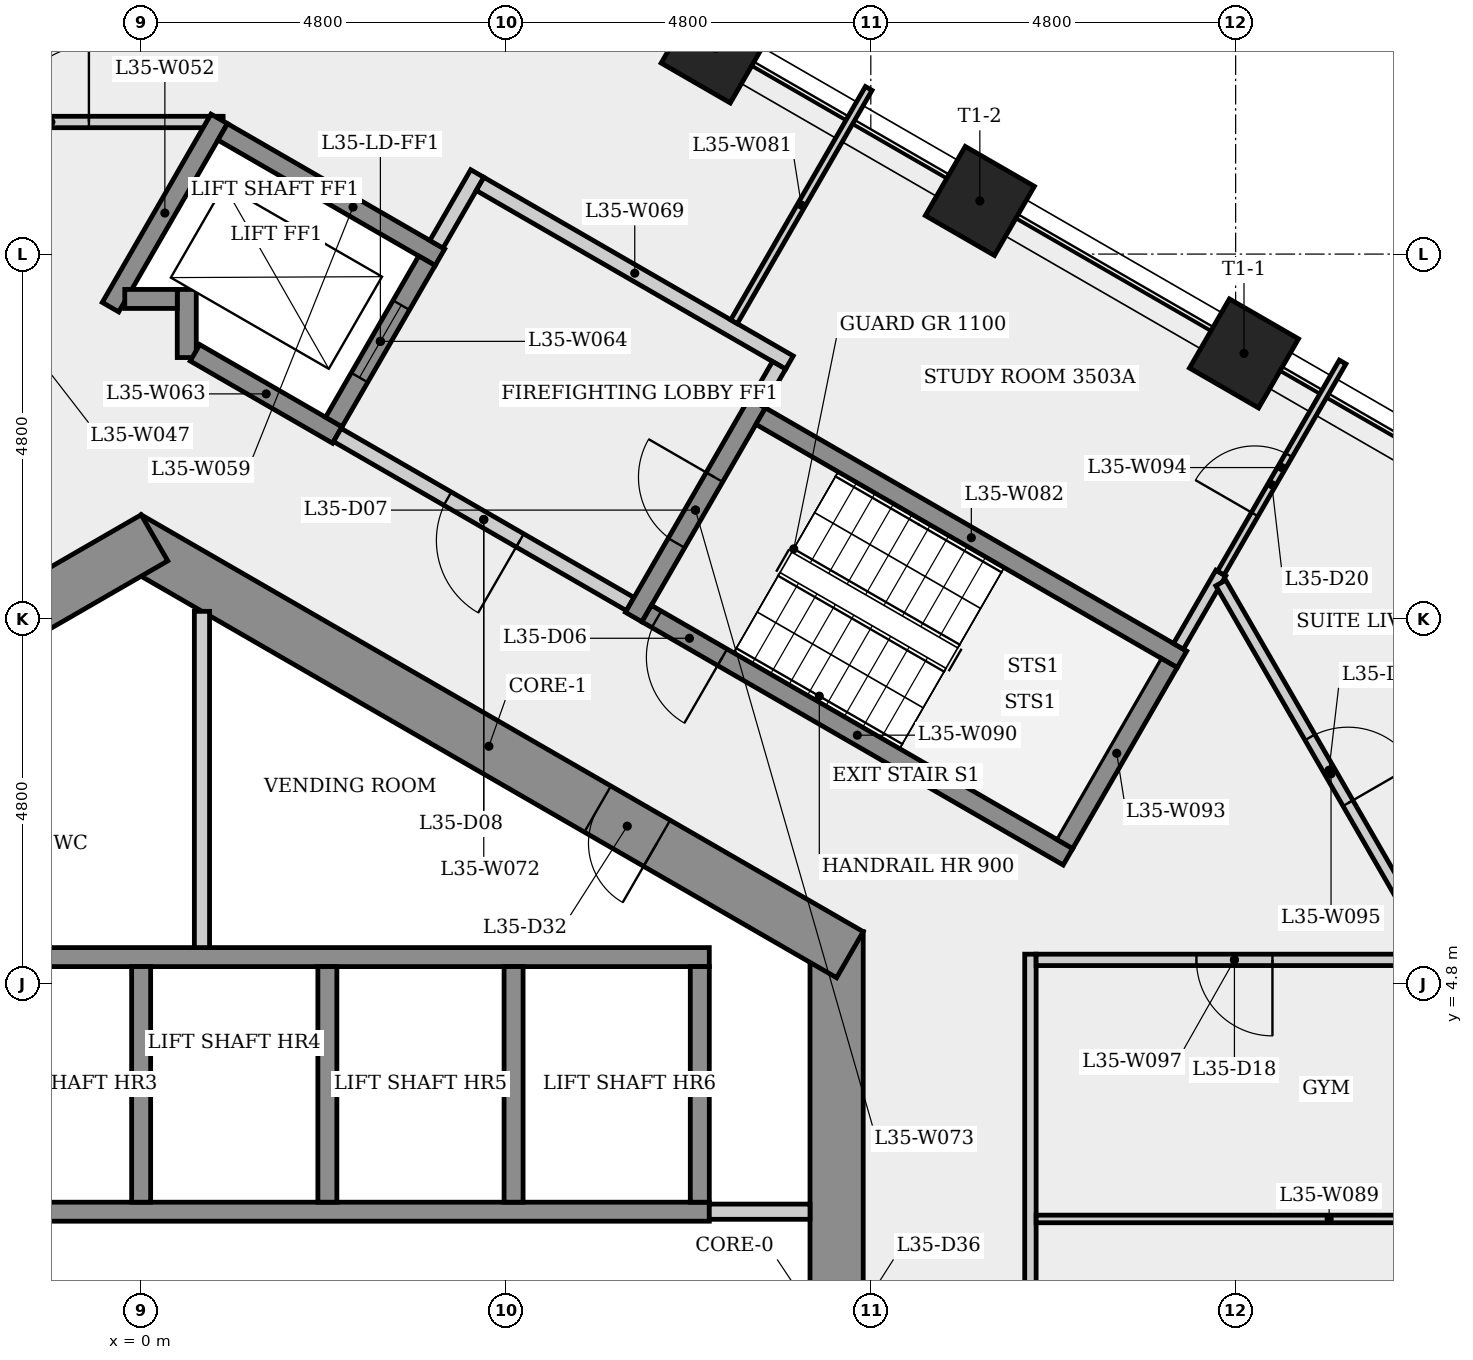
"""IFC4 building model, lengths in metres.
Left out: names, types, materials, properties, quantities, classifications, styles, units other than length and angle.
Written with IfcOpenShell. Run it as: python <this file> out.ifc"""

import sys

from ifc_helpers import new_model, si_unit, direction, frame, frame_2d, origin, origin_2d, place, context, subcontext, project, spatial, rectangle, extrude, element, fill, save


model = new_model("IFC4")
c1 = context("Model", 3, precision=1e-05, world=origin(), true_north=direction((0.0, 1.0)))
c2 = subcontext(c1, "Body", "Model", "MODEL_VIEW")
j1 = project(units=[si_unit("LENGTHUNIT", "METRE"), si_unit("PLANEANGLEUNIT", "RADIAN")], contexts=[c1])
p1 = place(None, origin())
s1 = spatial("IfcSite", under=j1, at=p1, CompositionType="ELEMENT")
p2 = place(p1, origin())
s2 = spatial("IfcBuilding", under=s1, at=p2, CompositionType="ELEMENT")
p3 = place(p2, frame((0.0, 0.0, 132.5)))
s3 = spatial("IfcBuildingStorey", under=s2, at=p3, CompositionType="ELEMENT", Elevation=132.5)
p4 = place(p3, frame((9.15, -5.485, 0.0), z_axis=(0.0, 0.0, 1.0), x_axis=(0.0, 1.0, 0.0)))
e1 = element("IfcWall", 1, at=p4, inside=s3, PredefinedType="SHEAR", context=c2, shape_type="SweptSolid", body=[
    extrude(rectangle(XDim=10.97, YDim=0.7, at=frame_2d((5.485, 0.0))), origin(), (0.0, 0.0, 1.0), 3.4),
])
p5 = place(p4, frame((4.685, 0.0, 0.0)))
e2 = element("IfcOpeningElement", 2, at=p5, cuts=e1, PredefinedType="OPENING", context=c2, shape_type="SweptSolid", body=[
    extrude(rectangle(XDim=1.6, YDim=2.1, at=frame_2d((0.8, 1.05))), frame((0.0, 0.36, 0.0), z_axis=(0.0, -1.0, 0.0), x_axis=(1.0, 0.0, 0.0)), (0.0, 0.0, 1.0), 0.72),
])
p6 = place(p3, frame((9.325, 5.182, 0.0), z_axis=(0.0, 0.0, 1.0), x_axis=(-0.866023993627, 0.500002442456, 0.0)))
e3 = element("IfcWall", 3, at=p6, inside=s3, PredefinedType="SHEAR", context=c2, shape_type="SweptSolid", body=[
    extrude(rectangle(XDim=10.97, YDim=0.7, at=frame_2d((5.485, 0.0))), origin(), (0.0, 0.0, 1.0), 3.4),
])
p7 = place(p6, frame((2.933, 0.0, 0.0)))
e4 = element("IfcOpeningElement", 4, at=p7, cuts=e3, PredefinedType="OPENING", context=c2, shape_type="SweptSolid", body=[
    extrude(rectangle(XDim=0.9, YDim=2.1, at=frame_2d((0.45, 1.05))), frame((0.0, 0.36, 0.0), z_axis=(0.0, -1.0, 0.0), x_axis=(1.0, 0.0, 0.0)), (0.0, 0.0, 1.0), 0.72),
])
p8 = place(p3, frame((0.175, 10.667, 0.0), z_axis=(0.0, 0.0, 1.0), x_axis=(-0.866023993627, -0.500002442456, 0.0)))
e5 = element("IfcWall", 5, at=p8, inside=s3, PredefinedType="SHEAR", context=c2, shape_type="SweptSolid", body=[
    extrude(rectangle(XDim=10.97, YDim=0.7, at=frame_2d((5.485, 0.0))), origin(), (0.0, 0.0, 1.0), 3.4),
])
p9 = place(p8, frame((9.254, 0.0, 0.0)))
e6 = element("IfcOpeningElement", 6, at=p9, cuts=e5, PredefinedType="OPENING", context=c2, shape_type="SweptSolid", body=[
    extrude(rectangle(XDim=0.9, YDim=2.1, at=frame_2d((0.45, 1.05))), frame((0.0, 0.36, 0.0), z_axis=(0.0, -1.0, 0.0), x_axis=(1.0, 0.0, 0.0)), (0.0, 0.0, 1.0), 0.72),
])
p10 = place(p8, frame((2.033, 0.0, 0.0)))
e7 = element("IfcOpeningElement", 7, at=p10, cuts=e5, PredefinedType="OPENING", context=c2, shape_type="SweptSolid", body=[
    extrude(rectangle(XDim=0.9, YDim=2.1, at=frame_2d((0.45, 1.05))), frame((0.0, 0.36, 0.0), z_axis=(0.0, -1.0, 0.0), x_axis=(1.0, 0.0, 0.0)), (0.0, 0.0, 1.0), 0.72),
])
for number, where, z_axis, x_axis in (
    (8, (14.51, 13.093, 0.0), (0.0, 0.0, 1.0), (0.5, 0.866, 0.0)),
    (9, (11.035, 15.099, 0.0), (0.0, 0.0, 1.0), (0.5, 0.866, 0.0)),
    (10, (7.559, 17.106, 0.0), (0.0, 0.0, 1.0), (0.5, 0.866, 0.0)),
):
    element("IfcColumn", number, at=place(p3, frame(where, z_axis=z_axis, x_axis=x_axis)), inside=s3, PredefinedType="COLUMN", context=c2, shape_type="SweptSolid", body=[
        extrude(rectangle(XDim=1.05, YDim=1.05, at=origin_2d()), origin(), (0.0, 0.0, 1.0), 3.4),
    ])
p11 = place(p3, frame((-7.475, 1.8, 0.0), z_axis=(0.0, 0.0, 1.0), x_axis=(1.0, 0.0, 0.0)))
e11 = element("IfcWall", 11, at=p11, inside=s3, PredefinedType="SHEAR", context=c2, shape_type="SweptSolid", body=[
    extrude(rectangle(XDim=14.95, YDim=0.25, at=frame_2d((7.475, 0.0))), origin(), (0.0, 0.0, 1.0), 3.0),
])
p12 = place(p3, frame((-7.225, 5.15, 0.0), z_axis=(0.0, 0.0, 1.0), x_axis=(1.0, 0.0, 0.0)))
e12 = element("IfcWall", 12, at=p12, inside=s3, PredefinedType="SHEAR", context=c2, shape_type="SweptSolid", body=[
    extrude(rectangle(XDim=14.7, YDim=0.25, at=frame_2d((7.35, 0.0))), origin(), (0.0, 0.0, 1.0), 3.0),
])
p13 = place(p3, frame((-3.488, 16.138, 0.0), z_axis=(0.0, 0.0, 1.0), x_axis=(1.0, 0.0, 0.0)))
e13 = element("IfcWall", 13, at=p13, inside=s3, PredefinedType="PARTITIONING", context=c2, shape_type="SweptSolid", body=[
    extrude(rectangle(XDim=4.566, YDim=0.15, at=frame_2d((2.283, 0.0))), origin(), (0.0, 0.0, 1.0), 3.0),
])
p14 = place(p13, frame((1.801, 0.0, 0.0)))
e14 = element("IfcOpeningElement", 14, at=p14, cuts=e13, PredefinedType="OPENING", context=c2, shape_type="SweptSolid", body=[
    extrude(rectangle(XDim=1.0, YDim=2.1, at=frame_2d((0.5, 1.05))), frame((0.0, 0.085, 0.0), z_axis=(0.0, -1.0, 0.0), x_axis=(1.0, 0.0, 0.0)), (0.0, 0.0, 1.0), 0.17),
])
p15 = place(p3, frame((-0.403, 13.702, 0.0), z_axis=(0.0, 0.0, 1.0), x_axis=(0.499976111731, 0.866039195244, 0.0)))
e15 = element("IfcWall", 15, at=p15, inside=s3, PredefinedType="SHEAR", context=c2, shape_type="SweptSolid", body=[
    extrude(rectangle(XDim=2.861, YDim=0.25, at=frame_2d((1.43, 0.0))), origin(), (0.0, 0.0, 1.0), 3.0),
])
p16 = place(p3, frame((0.0, 5.025, 0.0), z_axis=(0.0, 0.0, 1.0), x_axis=(0.0, -1.0, 0.0)))
e16 = element("IfcWall", 16, at=p16, inside=s3, PredefinedType="SHEAR", context=c2, shape_type="SweptSolid", body=[
    extrude(rectangle(XDim=3.1, YDim=0.25, at=frame_2d((1.55, 0.0))), origin(), (0.0, 0.0, 1.0), 3.4),
])
p17 = place(p3, frame((0.6, 13.039, 0.0), z_axis=(0.0, 0.0, 1.0), x_axis=(0.0, 1.0, 0.0)))
e17 = element("IfcWall", 17, at=p17, inside=s3, PredefinedType="SHEAR", context=c2, shape_type="SweptSolid", body=[
    extrude(rectangle(XDim=0.896, YDim=0.25, at=frame_2d((0.448, 0.0))), origin(), (0.0, 0.0, 1.0), 3.0),
])
p18 = place(p3, frame((0.475, 13.81, 0.0), z_axis=(0.0, 0.0, 1.0), x_axis=(-1.0, 0.0, 0.0)))
e18 = element("IfcWall", 18, at=p18, inside=s3, PredefinedType="SHEAR", context=c2, shape_type="SweptSolid", body=[
    extrude(rectangle(XDim=0.691, YDim=0.25, at=frame_2d((0.345, 0.0))), origin(), (0.0, 0.0, 1.0), 3.4),
])
p19 = place(p3, frame((0.8, 9.699, 0.0), z_axis=(0.0, 0.0, 1.0), x_axis=(0.0, -1.0, 0.0)))
e19 = element("IfcWall", 19, at=p19, inside=s3, PredefinedType="PARTITIONING", context=c2, shape_type="SweptSolid", body=[
    extrude(rectangle(XDim=4.425, YDim=0.2, at=frame_2d((2.212, 0.0))), origin(), (0.0, 0.0, 1.0), 3.0),
])
p20 = place(p3, frame((1.073, 16.008, 0.0), z_axis=(0.0, 0.0, 1.0), x_axis=(0.866040211805, -0.499974350878, 0.0)))
e20 = element("IfcWall", 20, at=p20, inside=s3, PredefinedType="SHEAR", context=c2, shape_type="SweptSolid", body=[
    extrude(rectangle(XDim=3.3, YDim=0.25, at=frame_2d((1.65, 0.0))), origin(), (0.0, 0.0, 1.0), 3.0),
])
p21 = place(p3, frame((2.45, 5.025, 0.0), z_axis=(0.0, 0.0, 1.0), x_axis=(0.0, -1.0, 0.0)))
e21 = element("IfcWall", 21, at=p21, inside=s3, PredefinedType="SHEAR", context=c2, shape_type="SweptSolid", body=[
    extrude(rectangle(XDim=3.1, YDim=0.25, at=frame_2d((1.55, 0.0))), origin(), (0.0, 0.0, 1.0), 3.4),
])
p22 = place(p3, frame((2.581, 12.02, 0.0), z_axis=(0.0, 0.0, 1.0), x_axis=(-0.86603892542, 0.499976579108, 0.0)))
e22 = element("IfcWall", 22, at=p22, inside=s3, PredefinedType="SHEAR", context=c2, shape_type="SweptSolid", body=[
    extrude(rectangle(XDim=2.162, YDim=0.25, at=frame_2d((1.081, 0.0))), origin(), (0.0, 0.0, 1.0), 3.0),
])
p23 = place(p3, frame((2.535, 12.191, 0.0), z_axis=(0.0, 0.0, 1.0), x_axis=(0.500061746146, 0.865989751695, 0.0)))
e23 = element("IfcWall", 23, at=p23, inside=s3, PredefinedType="SHEAR", context=c2, shape_type="SweptSolid", body=[
    extrude(rectangle(XDim=2.45, YDim=0.25, at=frame_2d((1.225, 0.0))), origin(), (0.0, 0.0, 1.0), 3.4),
])
p24 = place(p23, frame((0.675, 0.0, 0.0)))
e24 = element("IfcOpeningElement", 24, at=p24, cuts=e23, PredefinedType="OPENING", context=c2, shape_type="SweptSolid", body=[
    extrude(rectangle(XDim=1.1, YDim=2.1, at=frame_2d((0.55, 1.05))), frame((0.0, 0.135, 0.0), z_axis=(0.0, -1.0, 0.0), x_axis=(1.0, 0.0, 0.0)), (0.0, 0.0, 1.0), 0.27),
])
p25 = place(p3, frame((3.885, 14.529, 0.0), z_axis=(0.0, 0.0, 1.0), x_axis=(0.499997628298, 0.866026773083, 0.0)))
e25 = element("IfcWall", 25, at=p25, inside=s3, PredefinedType="PARTITIONING", context=c2, shape_type="SweptSolid", body=[
    extrude(rectangle(XDim=1.075, YDim=0.2, at=frame_2d((0.538, 0.0))), origin(), (0.0, 0.0, 1.0), 3.0),
])
p26 = place(p3, frame((4.459, 15.323, 0.0), z_axis=(0.0, 0.0, 1.0), x_axis=(0.866016039709, -0.500016218704, 0.0)))
e26 = element("IfcWall", 26, at=p26, inside=s3, PredefinedType="PARTITIONING", context=c2, shape_type="SweptSolid", body=[
    extrude(rectangle(XDim=4.7, YDim=0.2, at=frame_2d((2.35, 0.0))), origin(), (0.0, 0.0, 1.0), 3.0),
])
p27 = place(p3, frame((4.9, 5.025, 0.0), z_axis=(0.0, 0.0, 1.0), x_axis=(0.0, -1.0, 0.0)))
e27 = element("IfcWall", 27, at=p27, inside=s3, PredefinedType="SHEAR", context=c2, shape_type="SweptSolid", body=[
    extrude(rectangle(XDim=3.1, YDim=0.25, at=frame_2d((1.55, 0.0))), origin(), (0.0, 0.0, 1.0), 3.4),
])
p28 = place(p3, frame((6.435, 9.795, 0.0), z_axis=(0.0, 0.0, 1.0), x_axis=(-0.866012907634, 0.500021643343, 0.0)))
e28 = element("IfcWall", 28, at=p28, inside=s3, PredefinedType="PARTITIONING", context=c2, shape_type="SweptSolid", body=[
    extrude(rectangle(XDim=4.45, YDim=0.2, at=frame_2d((2.225, 0.0))), origin(), (0.0, 0.0, 1.0), 3.0),
])
p29 = place(p28, frame((1.675, 0.0, 0.0)))
e29 = element("IfcOpeningElement", 29, at=p29, cuts=e28, PredefinedType="OPENING", context=c2, shape_type="SweptSolid", body=[
    extrude(rectangle(XDim=1.1, YDim=2.1, at=frame_2d((0.55, 1.05))), frame((0.0, 0.11, 0.0), z_axis=(0.0, -1.0, 0.0), x_axis=(1.0, 0.0, 0.0)), (0.0, 0.0, 1.0), 0.22),
])
p30 = place(p3, frame((6.48, 9.624, 0.0), z_axis=(0.0, 0.0, 1.0), x_axis=(0.500017246033, 0.866015446554, 0.0)))
e30 = element("IfcWall", 30, at=p30, inside=s3, PredefinedType="SHEAR", context=c2, shape_type="SweptSolid", body=[
    extrude(rectangle(XDim=3.25, YDim=0.25, at=frame_2d((1.625, 0.0))), origin(), (0.0, 0.0, 1.0), 3.0),
])
p31 = place(p30, frame((1.125, 0.0, 0.0)))
e31 = element("IfcOpeningElement", 31, at=p31, cuts=e30, PredefinedType="OPENING", context=c2, shape_type="SweptSolid", body=[
    extrude(rectangle(XDim=1.0, YDim=2.1, at=frame_2d((0.5, 1.05))), frame((0.0, 0.135, 0.0), z_axis=(0.0, -1.0, 0.0), x_axis=(1.0, 0.0, 0.0)), (0.0, 0.0, 1.0), 0.27),
])
p32 = place(p3, frame((7.475, 1.8, 0.0), z_axis=(0.0, 0.0, 1.0), x_axis=(1.0, 0.0, 0.0)))
e32 = element("IfcWall", 32, at=p32, inside=s3, PredefinedType="PARTITIONING", context=c2, shape_type="SweptSolid", body=[
    extrude(rectangle(XDim=1.325, YDim=0.2, at=frame_2d((0.663, 0.0))), origin(), (0.0, 0.0, 1.0), 3.0),
])
p33 = place(p3, frame((7.35, 5.025, 0.0), z_axis=(0.0, 0.0, 1.0), x_axis=(0.0, -1.0, 0.0)))
e33 = element("IfcWall", 33, at=p33, inside=s3, PredefinedType="SHEAR", context=c2, shape_type="SweptSolid", body=[
    extrude(rectangle(XDim=3.1, YDim=0.25, at=frame_2d((1.55, 0.0))), origin(), (0.0, 0.0, 1.0), 3.4),
])
p34 = place(p3, frame((7.8, 13.51, 0.0), z_axis=(0.0, 0.0, 1.0), x_axis=(0.499976875499, 0.866038754309, 0.0)))
e34 = element("IfcWall", 34, at=p34, inside=s3, PredefinedType="PARTITIONING", context=c2, shape_type="SweptSolid", body=[
    extrude(rectangle(XDim=3.544, YDim=0.1, at=frame_2d((1.772, 0.0))), origin(), (0.0, 0.0, 1.0), 3.0),
])
p35 = place(p3, frame((8.151, 12.268, 0.0), z_axis=(0.0, 0.0, 1.0), x_axis=(0.866025499775, -0.499999833739, 0.0)))
e35 = element("IfcWall", 35, at=p35, inside=s3, PredefinedType="SHEAR", context=c2, shape_type="SweptSolid", body=[
    extrude(rectangle(XDim=6.4, YDim=0.25, at=frame_2d((3.2, 0.0))), origin(), (0.0, 0.0, 1.0), 3.0),
])
p36 = place(p3, frame((8.393, 12.937, 0.0), z_axis=(0.0, 0.0, 1.0), x_axis=(-0.500065409566, -0.86598763626, 0.0)))
e36 = element("IfcWall", 36, at=p36, inside=s3, PredefinedType="PARTITIONING", context=c2, shape_type="SweptSolid", body=[
    extrude(rectangle(XDim=0.575, YDim=0.2, at=frame_2d((0.288, 0.0))), origin(), (0.0, 0.0, 1.0), 3.0),
])
p37 = place(p3, frame((11.7, -5.038, 0.0), z_axis=(0.0, 0.0, 1.0), x_axis=(0.0, 1.0, 0.0)))
e37 = element("IfcWall", 37, at=p37, inside=s3, PredefinedType="PARTITIONING", context=c2, shape_type="SweptSolid", body=[
    extrude(rectangle(XDim=10.227, YDim=0.15, at=frame_2d((5.113, 0.0))), origin(), (0.0, 0.0, 1.0), 3.0),
])
p38 = place(p37, frame((2.856, 0.0, 0.0)))
e38 = element("IfcOpeningElement", 38, at=p38, cuts=e37, PredefinedType="OPENING", context=c2, shape_type="SweptSolid", body=[
    extrude(rectangle(XDim=1.0, YDim=2.1, at=frame_2d((0.5, 1.05))), frame((0.0, 0.085, 0.0), z_axis=(0.0, -1.0, 0.0), x_axis=(1.0, 0.0, 0.0)), (0.0, 0.0, 1.0), 0.17),
])
p39 = place(p3, frame((11.775, 1.705, 0.0), z_axis=(0.0, 0.0, 1.0), x_axis=(1.0, 0.0, 0.0)))
e39 = element("IfcWall", 39, at=p39, inside=s3, PredefinedType="PARTITIONING", context=c2, shape_type="SweptSolid", body=[
    extrude(rectangle(XDim=7.711, YDim=0.1, at=frame_2d((3.855, 0.0))), origin(), (0.0, 0.0, 1.0), 3.0),
])
p40 = place(p3, frame((12.194, 6.47, 0.0), z_axis=(0.0, 0.0, 1.0), x_axis=(-0.866025499775, 0.499999833739, 0.0)))
e40 = element("IfcWall", 40, at=p40, inside=s3, PredefinedType="SHEAR", context=c2, shape_type="SweptSolid", body=[
    extrude(rectangle(XDim=6.4, YDim=0.25, at=frame_2d((3.2, 0.0))), origin(), (0.0, 0.0, 1.0), 3.0),
])
p41 = place(p40, frame((5.25, 0.0, 0.0)))
e41 = element("IfcOpeningElement", 41, at=p41, cuts=e40, PredefinedType="OPENING", context=c2, shape_type="SweptSolid", body=[
    extrude(rectangle(XDim=1.0, YDim=2.1, at=frame_2d((0.5, 1.05))), frame((0.0, 0.135, 0.0), z_axis=(0.0, -1.0, 0.0), x_axis=(1.0, 0.0, 0.0)), (0.0, 0.0, 1.0), 0.27),
])
p42 = place(p3, frame((13.648, 9.239, 0.0), z_axis=(0.0, 0.0, 1.0), x_axis=(0.500171649313, 0.865926279324, 0.0)))
e42 = element("IfcWall", 42, at=p42, inside=s3, PredefinedType="PARTITIONING", context=c2, shape_type="SweptSolid", body=[
    extrude(rectangle(XDim=1.113, YDim=0.15, at=frame_2d((0.557, 0.0))), origin(), (0.0, 0.0, 1.0), 3.0),
])
p43 = place(p3, frame((13.523, 9.022, 0.0), z_axis=(0.0, 0.0, 1.0), x_axis=(-0.500034990121, -0.866005201286, 0.0)))
e43 = element("IfcWall", 43, at=p43, inside=s3, PredefinedType="SHEAR", context=c2, shape_type="SweptSolid", body=[
    extrude(rectangle(XDim=2.75, YDim=0.25, at=frame_2d((1.375, 0.0))), origin(), (0.0, 0.0, 1.0), 3.0),
])
p44 = place(p3, frame((14.205, 10.203, 0.0), z_axis=(0.0, 0.0, 1.0), x_axis=(0.499988314375, 0.866032150378, 0.0)))
e44 = element("IfcWall", 44, at=p44, inside=s3, PredefinedType="PARTITIONING", context=c2, shape_type="SweptSolid", body=[
    extrude(rectangle(XDim=3.206, YDim=0.1, at=frame_2d((1.603, 0.0))), origin(), (0.0, 0.0, 1.0), 3.0),
])
p45 = place(p44, frame((0.893, 0.0, 0.0)))
e45 = element("IfcOpeningElement", 45, at=p45, cuts=e44, PredefinedType="OPENING", context=c2, shape_type="SweptSolid", body=[
    extrude(rectangle(XDim=0.9, YDim=2.1, at=frame_2d((0.45, 1.05))), frame((0.0, 0.06, 0.0), z_axis=(0.0, -1.0, 0.0), x_axis=(1.0, 0.0, 0.0)), (0.0, 0.0, 1.0), 0.12),
])
p46 = place(p3, frame((14.205, 10.073, 0.0), z_axis=(0.0, 0.0, 1.0), x_axis=(0.500017486934, -0.866015307463, 0.0)))
e46 = element("IfcWall", 46, at=p46, inside=s3, PredefinedType="PARTITIONING", context=c2, shape_type="SweptSolid", body=[
    extrude(rectangle(XDim=5.802, YDim=0.15, at=frame_2d((2.901, 0.0))), origin(), (0.0, 0.0, 1.0), 3.0),
])
p47 = place(p46, frame((2.346, 0.0, 0.0)))
e47 = element("IfcOpeningElement", 47, at=p47, cuts=e46, PredefinedType="OPENING", context=c2, shape_type="SweptSolid", body=[
    extrude(rectangle(XDim=1.0, YDim=2.1, at=frame_2d((0.5, 1.05))), frame((0.0, 0.085, 0.0), z_axis=(0.0, -1.0, 0.0), x_axis=(1.0, 0.0, 0.0)), (0.0, 0.0, 1.0), 0.17),
])
p48 = place(p3, frame((16.993, 5.113, 0.0), z_axis=(0.0, 0.0, 1.0), x_axis=(-1.0, 0.0, 0.0)))
e48 = element("IfcWall", 48, at=p48, inside=s3, PredefinedType="PARTITIONING", context=c2, shape_type="SweptSolid", body=[
    extrude(rectangle(XDim=5.218, YDim=0.15, at=frame_2d((2.609, 0.0))), origin(), (0.0, 0.0, 1.0), 3.0),
])
p49 = place(p48, frame((2.109, 0.0, 0.0)))
e49 = element("IfcOpeningElement", 49, at=p49, cuts=e48, PredefinedType="OPENING", context=c2, shape_type="SweptSolid", body=[
    extrude(rectangle(XDim=1.0, YDim=2.1, at=frame_2d((0.5, 1.05))), frame((0.0, 0.085, 0.0), z_axis=(0.0, -1.0, 0.0), x_axis=(1.0, 0.0, 0.0)), (0.0, 0.0, 1.0), 0.17),
])
p50 = place(p41, origin())
e50 = element("IfcDoor", 50, at=p50, inside=s3, OperationType="SINGLE_SWING_LEFT", PredefinedType="DOOR", context=c2, shape_type="SweptSolid", body=[
    extrude(rectangle(XDim=1.0, YDim=2.1, at=frame_2d((0.5, 1.05))), frame((0.0, 0.025, 0.0), z_axis=(0.0, -1.0, 0.0), x_axis=(1.0, 0.0, 0.0)), (0.0, 0.0, 1.0), 0.05),
])
fill(e41, e50)
p51 = place(p31, origin())
e51 = element("IfcDoor", 51, at=p51, inside=s3, OperationType="SINGLE_SWING_RIGHT", PredefinedType="DOOR", context=c2, shape_type="SweptSolid", body=[
    extrude(rectangle(XDim=1.0, YDim=2.1, at=frame_2d((0.5, 1.05))), frame((0.0, 0.025, 0.0), z_axis=(0.0, -1.0, 0.0), x_axis=(1.0, 0.0, 0.0)), (0.0, 0.0, 1.0), 0.05),
])
fill(e31, e51)
p52 = place(p29, origin())
e52 = element("IfcDoor", 52, at=p52, inside=s3, OperationType="SINGLE_SWING_LEFT", PredefinedType="DOOR", context=c2, shape_type="SweptSolid", body=[
    extrude(rectangle(XDim=1.1, YDim=2.1, at=frame_2d((0.55, 1.05))), frame((0.0, 0.025, 0.0), z_axis=(0.0, -1.0, 0.0), x_axis=(1.0, 0.0, 0.0)), (0.0, 0.0, 1.0), 0.05),
])
fill(e29, e52)
p53 = place(p24, origin())
e53 = element("IfcDoor", 53, at=p53, inside=s3, OperationType="SLIDING_TO_LEFT", PredefinedType="DOOR", context=c2, shape_type="SweptSolid", body=[
    extrude(rectangle(XDim=1.1, YDim=2.1, at=frame_2d((0.55, 1.05))), frame((0.0, 0.025, 0.0), z_axis=(0.0, -1.0, 0.0), x_axis=(1.0, 0.0, 0.0)), (0.0, 0.0, 1.0), 0.05),
])
fill(e24, e53)
p54 = place(p49, origin())
e54 = element("IfcDoor", 54, at=p54, inside=s3, OperationType="SINGLE_SWING_LEFT", PredefinedType="DOOR", context=c2, shape_type="SweptSolid", body=[
    extrude(rectangle(XDim=1.0, YDim=2.1, at=frame_2d((0.5, 1.05))), frame((0.0, 0.025, 0.0), z_axis=(0.0, -1.0, 0.0), x_axis=(1.0, 0.0, 0.0)), (0.0, 0.0, 1.0), 0.05),
])
fill(e49, e54)
p55 = place(p47, origin())
e55 = element("IfcDoor", 55, at=p55, inside=s3, OperationType="SINGLE_SWING_RIGHT", PredefinedType="DOOR", context=c2, shape_type="SweptSolid", body=[
    extrude(rectangle(XDim=1.0, YDim=2.1, at=frame_2d((0.5, 1.05))), frame((0.0, 0.025, 0.0), z_axis=(0.0, -1.0, 0.0), x_axis=(1.0, 0.0, 0.0)), (0.0, 0.0, 1.0), 0.05),
])
fill(e47, e55)
p56 = place(p45, origin())
e56 = element("IfcDoor", 56, at=p56, inside=s3, OperationType="SINGLE_SWING_LEFT", PredefinedType="DOOR", context=c2, shape_type="SweptSolid", body=[
    extrude(rectangle(XDim=0.9, YDim=2.1, at=frame_2d((0.45, 1.05))), frame((0.0, 0.025, 0.0), z_axis=(0.0, -1.0, 0.0), x_axis=(1.0, 0.0, 0.0)), (0.0, 0.0, 1.0), 0.05),
])
fill(e45, e56)
p57 = place(p14, origin())
e57 = element("IfcDoor", 57, at=p57, inside=s3, OperationType="SINGLE_SWING_RIGHT", PredefinedType="DOOR", context=c2, shape_type="SweptSolid", body=[
    extrude(rectangle(XDim=1.0, YDim=2.1, at=frame_2d((0.5, 1.05))), frame((0.0, 0.025, 0.0), z_axis=(0.0, -1.0, 0.0), x_axis=(1.0, 0.0, 0.0)), (0.0, 0.0, 1.0), 0.05),
])
fill(e14, e57)
p58 = place(p7, origin())
e58 = element("IfcDoor", 58, at=p58, inside=s3, OperationType="SINGLE_SWING_LEFT", PredefinedType="DOOR", context=c2, shape_type="SweptSolid", body=[
    extrude(rectangle(XDim=0.9, YDim=2.1, at=frame_2d((0.45, 1.05))), frame((0.0, 0.025, 0.0), z_axis=(0.0, -1.0, 0.0), x_axis=(1.0, 0.0, 0.0)), (0.0, 0.0, 1.0), 0.05),
])
fill(e4, e58)
save(model, sys.argv[1])
